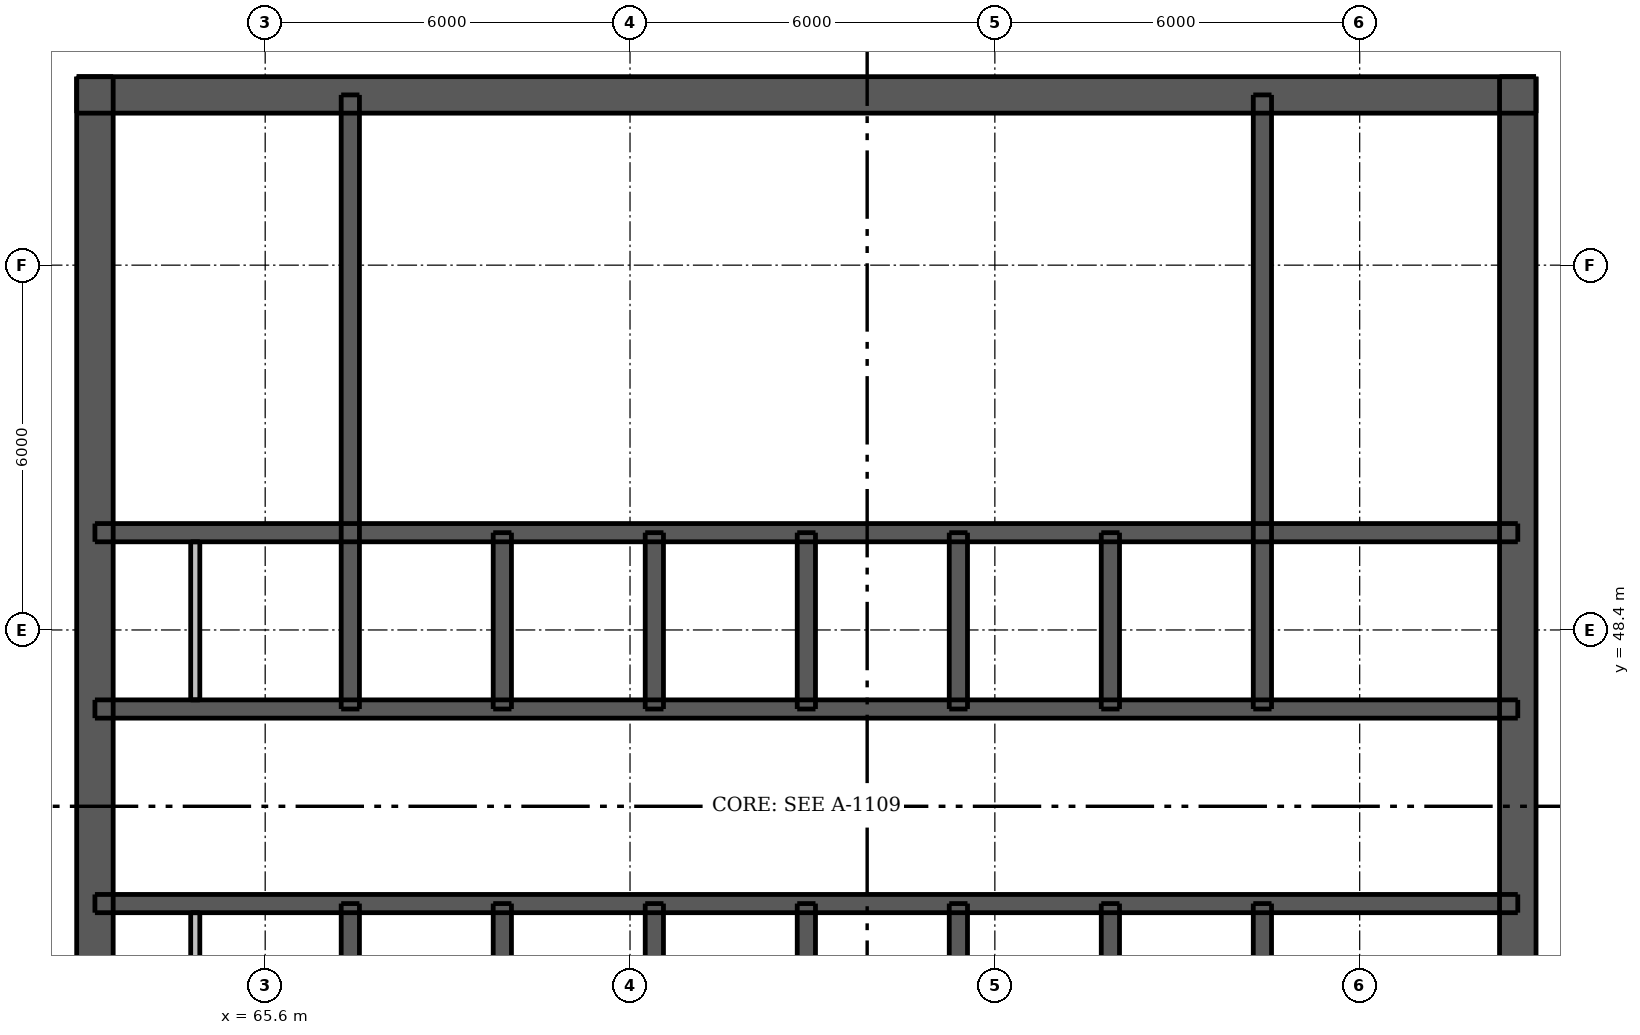
"""IFC4 building model, lengths in metres.
Left out: names, types, materials, properties, quantities, classifications, styles, units other than length and angle.
Written with IfcOpenShell. Run it as: python <this file> out.ifc"""

import sys

from ifc_helpers import new_model, si_unit, direction, frame, frame_2d, origin, place, context, subcontext, project, spatial, rectangle, extrude, element, fill, save


model = new_model("IFC4")
c1 = context("Model", 3, precision=1e-05, world=origin(), true_north=direction((0.0, 1.0)))
c2 = subcontext(c1, "Body", "Model", "MODEL_VIEW")
j1 = project(units=[si_unit("LENGTHUNIT", "METRE"), si_unit("PLANEANGLEUNIT", "RADIAN")], contexts=[c1])
p1 = place(None, origin())
s1 = spatial("IfcSite", under=j1, at=p1, CompositionType="ELEMENT")
p2 = place(p1, origin())
s2 = spatial("IfcBuilding", under=s1, at=p2, CompositionType="ELEMENT")
p3 = place(p2, frame((0.0, 0.0, 190.3)))
s3 = spatial("IfcBuildingStorey", under=s2, at=p3, CompositionType="ELEMENT", Elevation=190.3)
p4 = place(p3, frame((62.5, 57.2, 0.0), z_axis=(0.0, 0.0, 1.0), x_axis=(1.0, 0.0, 0.0)))
e1 = element("IfcWall", 1, at=p4, inside=s3, PredefinedType="SHEAR", context=c2, shape_type="SweptSolid", body=[
    extrude(rectangle(XDim=24.0, YDim=0.6, at=frame_2d((12.0, 0.0))), origin(), (0.0, 0.0, 1.0), 3.05),
])
p5 = place(p4, frame((20.975, 0.0, 0.0)))
e2 = element("IfcOpeningElement", 2, at=p5, cuts=e1, PredefinedType="OPENING", context=c2, shape_type="SweptSolid", body=[
    extrude(rectangle(XDim=1.1, YDim=2.1, at=frame_2d((0.55, 1.05))), frame((0.0, 0.31, 0.0), z_axis=(0.0, -1.0, 0.0), x_axis=(1.0, 0.0, 0.0)), (0.0, 0.0, 1.0), 0.62),
])
p6 = place(p4, frame((1.925, 0.0, 0.0)))
e3 = element("IfcOpeningElement", 3, at=p6, cuts=e1, PredefinedType="OPENING", context=c2, shape_type="SweptSolid", body=[
    extrude(rectangle(XDim=1.1, YDim=2.1, at=frame_2d((0.55, 1.05))), frame((0.0, 0.31, 0.0), z_axis=(0.0, -1.0, 0.0), x_axis=(1.0, 0.0, 0.0)), (0.0, 0.0, 1.0), 0.62),
])
p7 = place(p4, frame((11.55, 0.0, 0.0)))
e4 = element("IfcOpeningElement", 4, at=p7, cuts=e1, PredefinedType="OPENING", context=c2, shape_type="SweptSolid", body=[
    extrude(rectangle(XDim=0.9, YDim=2.1, at=frame_2d((0.45, 1.05))), frame((0.0, 0.31, 0.0), z_axis=(0.0, -1.0, 0.0), x_axis=(1.0, 0.0, 0.0)), (0.0, 0.0, 1.0), 0.62),
])
p8 = place(p3, frame((62.8, 33.5, 0.0), z_axis=(0.0, 0.0, 1.0), x_axis=(0.0, 1.0, 0.0)))
e5 = element("IfcWall", 5, at=p8, inside=s3, PredefinedType="SHEAR", context=c2, shape_type="SweptSolid", body=[
    extrude(rectangle(XDim=24.0, YDim=0.6, at=frame_2d((12.0, 0.0))), origin(), (0.0, 0.0, 1.0), 3.05),
])
p9 = place(p8, frame((11.2, 0.0, 0.0)))
e6 = element("IfcOpeningElement", 6, at=p9, cuts=e5, PredefinedType="OPENING", context=c2, shape_type="SweptSolid", body=[
    extrude(rectangle(XDim=1.6, YDim=2.1, at=frame_2d((0.8, 1.05))), frame((0.0, 0.31, 0.0), z_axis=(0.0, -1.0, 0.0), x_axis=(1.0, 0.0, 0.0)), (0.0, 0.0, 1.0), 0.62),
])
p10 = place(p3, frame((86.2, 33.5, 0.0), z_axis=(0.0, 0.0, 1.0), x_axis=(0.0, 1.0, 0.0)))
e7 = element("IfcWall", 7, at=p10, inside=s3, PredefinedType="SHEAR", context=c2, shape_type="SweptSolid", body=[
    extrude(rectangle(XDim=24.0, YDim=0.6, at=frame_2d((12.0, 0.0))), origin(), (0.0, 0.0, 1.0), 3.05),
])
p11 = place(p10, frame((11.2, 0.0, 0.0)))
e8 = element("IfcOpeningElement", 8, at=p11, cuts=e7, PredefinedType="OPENING", context=c2, shape_type="SweptSolid", body=[
    extrude(rectangle(XDim=1.6, YDim=2.1, at=frame_2d((0.8, 1.05))), frame((0.0, 0.31, 0.0), z_axis=(0.0, -1.0, 0.0), x_axis=(1.0, 0.0, 0.0)), (0.0, 0.0, 1.0), 0.62),
])
p12 = place(p3, frame((62.8, 43.9, 0.0), z_axis=(0.0, 0.0, 1.0), x_axis=(1.0, 0.0, 0.0)))
e9 = element("IfcWall", 9, at=p12, inside=s3, PredefinedType="SHEAR", context=c2, shape_type="SweptSolid", body=[
    extrude(rectangle(XDim=23.4, YDim=0.3, at=frame_2d((11.7, 0.0))), origin(), (0.0, 0.0, 1.0), 3.05),
])
p13 = place(p12, frame((0.575, 0.0, 0.0)))
e10 = element("IfcOpeningElement", 10, at=p13, cuts=e9, PredefinedType="OPENING", context=c2, shape_type="SweptSolid", body=[
    extrude(rectangle(XDim=0.8, YDim=2.1, at=frame_2d((0.4, 1.05))), frame((0.0, 0.16, 0.0), z_axis=(0.0, -1.0, 0.0), x_axis=(1.0, 0.0, 0.0)), (0.0, 0.0, 1.0), 0.32),
])
p14 = place(p12, frame((2.4, 0.0, 0.0)))
e11 = element("IfcOpeningElement", 11, at=p14, cuts=e9, PredefinedType="OPENING", context=c2, shape_type="SweptSolid", body=[
    extrude(rectangle(XDim=0.9, YDim=2.1, at=frame_2d((0.45, 1.05))), frame((0.0, 0.16, 0.0), z_axis=(0.0, -1.0, 0.0), x_axis=(1.0, 0.0, 0.0)), (0.0, 0.0, 1.0), 0.32),
])
p15 = place(p12, frame((20.775, 0.0, 0.0)))
e12 = element("IfcOpeningElement", 12, at=p15, cuts=e9, PredefinedType="OPENING", context=c2, shape_type="SweptSolid", body=[
    extrude(rectangle(XDim=0.9, YDim=2.1, at=frame_2d((0.45, 1.05))), frame((0.0, 0.16, 0.0), z_axis=(0.0, -1.0, 0.0), x_axis=(1.0, 0.0, 0.0)), (0.0, 0.0, 1.0), 0.32),
])
p16 = place(p12, frame((7.5, 0.0, 0.0)))
e13 = element("IfcOpeningElement", 13, at=p16, cuts=e9, PredefinedType="OPENING", context=c2, shape_type="SweptSolid", body=[
    extrude(rectangle(XDim=0.9, YDim=2.1, at=frame_2d((0.45, 1.05))), frame((0.0, 0.16, 0.0), z_axis=(0.0, -1.0, 0.0), x_axis=(1.0, 0.0, 0.0)), (0.0, 0.0, 1.0), 0.32),
])
p17 = place(p12, frame((10.0, 0.0, 0.0)))
e14 = element("IfcOpeningElement", 14, at=p17, cuts=e9, PredefinedType="OPENING", context=c2, shape_type="SweptSolid", body=[
    extrude(rectangle(XDim=0.9, YDim=2.1, at=frame_2d((0.45, 1.05))), frame((0.0, 0.16, 0.0), z_axis=(0.0, -1.0, 0.0), x_axis=(1.0, 0.0, 0.0)), (0.0, 0.0, 1.0), 0.32),
])
p18 = place(p12, frame((15.0, 0.0, 0.0)))
e15 = element("IfcOpeningElement", 15, at=p18, cuts=e9, PredefinedType="OPENING", context=c2, shape_type="SweptSolid", body=[
    extrude(rectangle(XDim=0.9, YDim=2.1, at=frame_2d((0.45, 1.05))), frame((0.0, 0.16, 0.0), z_axis=(0.0, -1.0, 0.0), x_axis=(1.0, 0.0, 0.0)), (0.0, 0.0, 1.0), 0.32),
])
p19 = place(p12, frame((17.5, 0.0, 0.0)))
e16 = element("IfcOpeningElement", 16, at=p19, cuts=e9, PredefinedType="OPENING", context=c2, shape_type="SweptSolid", body=[
    extrude(rectangle(XDim=0.9, YDim=2.1, at=frame_2d((0.45, 1.05))), frame((0.0, 0.16, 0.0), z_axis=(0.0, -1.0, 0.0), x_axis=(1.0, 0.0, 0.0)), (0.0, 0.0, 1.0), 0.32),
])
p20 = place(p3, frame((62.8, 47.1, 0.0), z_axis=(0.0, 0.0, 1.0), x_axis=(1.0, 0.0, 0.0)))
e17 = element("IfcWall", 17, at=p20, inside=s3, PredefinedType="SHEAR", context=c2, shape_type="SweptSolid", body=[
    extrude(rectangle(XDim=23.4, YDim=0.3, at=frame_2d((11.7, 0.0))), origin(), (0.0, 0.0, 1.0), 3.05),
])
p21 = place(p20, frame((0.575, 0.0, 0.0)))
e18 = element("IfcOpeningElement", 18, at=p21, cuts=e17, PredefinedType="OPENING", context=c2, shape_type="SweptSolid", body=[
    extrude(rectangle(XDim=0.8, YDim=2.1, at=frame_2d((0.4, 1.05))), frame((0.0, 0.16, 0.0), z_axis=(0.0, -1.0, 0.0), x_axis=(1.0, 0.0, 0.0)), (0.0, 0.0, 1.0), 0.32),
])
p22 = place(p20, frame((2.4, 0.0, 0.0)))
e19 = element("IfcOpeningElement", 19, at=p22, cuts=e17, PredefinedType="OPENING", context=c2, shape_type="SweptSolid", body=[
    extrude(rectangle(XDim=0.9, YDim=2.1, at=frame_2d((0.45, 1.05))), frame((0.0, 0.16, 0.0), z_axis=(0.0, -1.0, 0.0), x_axis=(1.0, 0.0, 0.0)), (0.0, 0.0, 1.0), 0.32),
])
p23 = place(p20, frame((20.775, 0.0, 0.0)))
e20 = element("IfcOpeningElement", 20, at=p23, cuts=e17, PredefinedType="OPENING", context=c2, shape_type="SweptSolid", body=[
    extrude(rectangle(XDim=0.9, YDim=2.1, at=frame_2d((0.45, 1.05))), frame((0.0, 0.16, 0.0), z_axis=(0.0, -1.0, 0.0), x_axis=(1.0, 0.0, 0.0)), (0.0, 0.0, 1.0), 0.32),
])
p24 = place(p20, frame((4.9, 0.0, 0.0)))
e21 = element("IfcOpeningElement", 21, at=p24, cuts=e17, PredefinedType="OPENING", context=c2, shape_type="SweptSolid", body=[
    extrude(rectangle(XDim=1.1, YDim=2.1, at=frame_2d((0.55, 1.05))), frame((0.0, 0.16, 0.0), z_axis=(0.0, -1.0, 0.0), x_axis=(1.0, 0.0, 0.0)), (0.0, 0.0, 1.0), 0.32),
])
p25 = place(p20, frame((7.4, 0.0, 0.0)))
e22 = element("IfcOpeningElement", 22, at=p25, cuts=e17, PredefinedType="OPENING", context=c2, shape_type="SweptSolid", body=[
    extrude(rectangle(XDim=1.1, YDim=2.1, at=frame_2d((0.55, 1.05))), frame((0.0, 0.16, 0.0), z_axis=(0.0, -1.0, 0.0), x_axis=(1.0, 0.0, 0.0)), (0.0, 0.0, 1.0), 0.32),
])
p26 = place(p20, frame((9.9, 0.0, 0.0)))
e23 = element("IfcOpeningElement", 23, at=p26, cuts=e17, PredefinedType="OPENING", context=c2, shape_type="SweptSolid", body=[
    extrude(rectangle(XDim=1.1, YDim=2.1, at=frame_2d((0.55, 1.05))), frame((0.0, 0.16, 0.0), z_axis=(0.0, -1.0, 0.0), x_axis=(1.0, 0.0, 0.0)), (0.0, 0.0, 1.0), 0.32),
])
p27 = place(p20, frame((12.4, 0.0, 0.0)))
e24 = element("IfcOpeningElement", 24, at=p27, cuts=e17, PredefinedType="OPENING", context=c2, shape_type="SweptSolid", body=[
    extrude(rectangle(XDim=1.1, YDim=2.1, at=frame_2d((0.55, 1.05))), frame((0.0, 0.16, 0.0), z_axis=(0.0, -1.0, 0.0), x_axis=(1.0, 0.0, 0.0)), (0.0, 0.0, 1.0), 0.32),
])
p28 = place(p20, frame((14.9, 0.0, 0.0)))
e25 = element("IfcOpeningElement", 25, at=p28, cuts=e17, PredefinedType="OPENING", context=c2, shape_type="SweptSolid", body=[
    extrude(rectangle(XDim=1.1, YDim=2.1, at=frame_2d((0.55, 1.05))), frame((0.0, 0.16, 0.0), z_axis=(0.0, -1.0, 0.0), x_axis=(1.0, 0.0, 0.0)), (0.0, 0.0, 1.0), 0.32),
])
p29 = place(p20, frame((17.4, 0.0, 0.0)))
e26 = element("IfcOpeningElement", 26, at=p29, cuts=e17, PredefinedType="OPENING", context=c2, shape_type="SweptSolid", body=[
    extrude(rectangle(XDim=1.1, YDim=2.1, at=frame_2d((0.55, 1.05))), frame((0.0, 0.16, 0.0), z_axis=(0.0, -1.0, 0.0), x_axis=(1.0, 0.0, 0.0)), (0.0, 0.0, 1.0), 0.32),
])
p30 = place(p3, frame((62.8, 50.0, 0.0), z_axis=(0.0, 0.0, 1.0), x_axis=(1.0, 0.0, 0.0)))
e27 = element("IfcWall", 27, at=p30, inside=s3, PredefinedType="SHEAR", context=c2, shape_type="SweptSolid", body=[
    extrude(rectangle(XDim=23.4, YDim=0.3, at=frame_2d((11.7, 0.0))), origin(), (0.0, 0.0, 1.0), 3.05),
])
p31 = place(p3, frame((67.0, 33.8, 0.0), z_axis=(0.0, 0.0, 1.0), x_axis=(0.0, 1.0, 0.0)))
e28 = element("IfcWall", 28, at=p31, inside=s3, PredefinedType="SHEAR", context=c2, shape_type="SweptSolid", body=[
    extrude(rectangle(XDim=10.1, YDim=0.3, at=frame_2d((5.05, 0.0))), origin(), (0.0, 0.0, 1.0), 3.05),
])
p32 = place(p31, frame((0.5, 0.0, 0.0)))
e29 = element("IfcOpeningElement", 29, at=p32, cuts=e28, PredefinedType="OPENING", context=c2, shape_type="SweptSolid", body=[
    extrude(rectangle(XDim=1.1, YDim=2.1, at=frame_2d((0.55, 1.05))), frame((0.0, 0.16, 0.0), z_axis=(0.0, -1.0, 0.0), x_axis=(1.0, 0.0, 0.0)), (0.0, 0.0, 1.0), 0.32),
])
for number, where, z_axis, x_axis in (
    (30, (67.0, 47.1, 0.0), (0.0, 0.0, 1.0), (0.0, 1.0, 0.0)),
    (31, (82.0, 33.8, 0.0), (0.0, 0.0, 1.0), (0.0, 1.0, 0.0)),
    (32, (82.0, 47.1, 0.0), (0.0, 0.0, 1.0), (0.0, 1.0, 0.0)),
):
    element("IfcWall", number, at=place(p3, frame(where, z_axis=z_axis, x_axis=x_axis)), inside=s3, PredefinedType="SHEAR", context=c2, shape_type="SweptSolid", body=[
        extrude(rectangle(XDim=10.1, YDim=0.3, at=frame_2d((5.05, 0.0))), origin(), (0.0, 0.0, 1.0), 3.05),
    ])
for number, where, z_axis, x_axis in (
    (33, (69.5, 41.0, 0.0), (0.0, 0.0, 1.0), (0.0, 1.0, 0.0)),
    (34, (69.5, 47.1, 0.0), (0.0, 0.0, 1.0), (0.0, 1.0, 0.0)),
    (35, (72.0, 41.0, 0.0), (0.0, 0.0, 1.0), (0.0, 1.0, 0.0)),
    (36, (72.0, 47.1, 0.0), (0.0, 0.0, 1.0), (0.0, 1.0, 0.0)),
    (37, (74.5, 41.0, 0.0), (0.0, 0.0, 1.0), (0.0, 1.0, 0.0)),
    (38, (74.5, 47.1, 0.0), (0.0, 0.0, 1.0), (0.0, 1.0, 0.0)),
    (39, (77.0, 41.0, 0.0), (0.0, 0.0, 1.0), (0.0, 1.0, 0.0)),
    (40, (77.0, 47.1, 0.0), (0.0, 0.0, 1.0), (0.0, 1.0, 0.0)),
    (41, (79.5, 41.0, 0.0), (0.0, 0.0, 1.0), (0.0, 1.0, 0.0)),
    (42, (79.5, 47.1, 0.0), (0.0, 0.0, 1.0), (0.0, 1.0, 0.0)),
):
    element("IfcWall", number, at=place(p3, frame(where, z_axis=z_axis, x_axis=x_axis)), inside=s3, PredefinedType="SHEAR", context=c2, shape_type="SweptSolid", body=[
        extrude(rectangle(XDim=2.9, YDim=0.3, at=frame_2d((1.45, 0.0))), origin(), (0.0, 0.0, 1.0), 3.05),
    ])
for number, where, z_axis, x_axis in (
    (43, (64.45, 41.15, 0.0), (0.0, 0.0, 1.0), (0.0, 1.0, 0.0)),
    (44, (64.45, 47.25, 0.0), (0.0, 0.0, 1.0), (0.0, 1.0, 0.0)),
):
    element("IfcWall", number, at=place(p3, frame(where, z_axis=z_axis, x_axis=x_axis)), inside=s3, PredefinedType="PLUMBINGWALL", context=c2, shape_type="SweptSolid", body=[
        extrude(rectangle(XDim=2.6, YDim=0.15, at=frame_2d((1.3, 0.0))), origin(), (0.0, 0.0, 1.0), 3.05),
    ])
p33 = place(p5, origin())
e45 = element("IfcDoor", 45, at=p33, inside=s3, OperationType="SINGLE_SWING_RIGHT", PredefinedType="DOOR", context=c2, shape_type="SweptSolid", body=[
    extrude(rectangle(XDim=1.1, YDim=2.1, at=frame_2d((0.55, 1.05))), frame((0.0, -0.237, 0.0), z_axis=(0.0, -1.0, 0.0), x_axis=(1.0, 0.0, 0.0)), (0.0, 0.0, 1.0), 0.05),
])
fill(e2, e45)
p34 = place(p6, origin())
e46 = element("IfcDoor", 46, at=p34, inside=s3, OperationType="SINGLE_SWING_LEFT", PredefinedType="DOOR", context=c2, shape_type="SweptSolid", body=[
    extrude(rectangle(XDim=1.1, YDim=2.1, at=frame_2d((0.55, 1.05))), frame((0.0, -0.237, 0.0), z_axis=(0.0, -1.0, 0.0), x_axis=(1.0, 0.0, 0.0)), (0.0, 0.0, 1.0), 0.05),
])
fill(e3, e46)
p35 = place(p9, origin())
e47 = element("IfcDoor", 47, at=p35, inside=s3, OperationType="DOUBLE_DOOR_SINGLE_SWING", PredefinedType="DOOR", context=c2, shape_type="SweptSolid", body=[
    extrude(rectangle(XDim=1.6, YDim=2.1, at=frame_2d((0.8, 1.05))), frame((0.0, -0.237, 0.0), z_axis=(0.0, -1.0, 0.0), x_axis=(1.0, 0.0, 0.0)), (0.0, 0.0, 1.0), 0.05),
])
fill(e6, e47)
p36 = place(p11, origin())
e48 = element("IfcDoor", 48, at=p36, inside=s3, OperationType="DOUBLE_DOOR_SINGLE_SWING", PredefinedType="DOOR", context=c2, shape_type="SweptSolid", body=[
    extrude(rectangle(XDim=1.6, YDim=2.1, at=frame_2d((0.8, 1.05))), frame((0.0, 0.288, 0.0), z_axis=(0.0, -1.0, 0.0), x_axis=(1.0, 0.0, 0.0)), (0.0, 0.0, 1.0), 0.05),
])
fill(e8, e48)
p37 = place(p13, origin())
e49 = element("IfcDoor", 49, at=p37, inside=s3, OperationType="SINGLE_SWING_LEFT", PredefinedType="DOOR", context=c2, shape_type="SweptSolid", body=[
    extrude(rectangle(XDim=0.8, YDim=2.1, at=frame_2d((0.4, 1.05))), frame((0.0, -0.087, 0.0), z_axis=(0.0, -1.0, 0.0), x_axis=(1.0, 0.0, 0.0)), (0.0, 0.0, 1.0), 0.05),
])
fill(e10, e49)
p38 = place(p14, origin())
e50 = element("IfcDoor", 50, at=p38, inside=s3, OperationType="SINGLE_SWING_RIGHT", PredefinedType="DOOR", context=c2, shape_type="SweptSolid", body=[
    extrude(rectangle(XDim=0.9, YDim=2.1, at=frame_2d((0.45, 1.05))), frame((0.0, -0.087, 0.0), z_axis=(0.0, -1.0, 0.0), x_axis=(1.0, 0.0, 0.0)), (0.0, 0.0, 1.0), 0.05),
])
fill(e11, e50)
p39 = place(p15, origin())
e51 = element("IfcDoor", 51, at=p39, inside=s3, OperationType="SINGLE_SWING_LEFT", PredefinedType="DOOR", context=c2, shape_type="SweptSolid", body=[
    extrude(rectangle(XDim=0.9, YDim=2.1, at=frame_2d((0.45, 1.05))), frame((0.0, -0.087, 0.0), z_axis=(0.0, -1.0, 0.0), x_axis=(1.0, 0.0, 0.0)), (0.0, 0.0, 1.0), 0.05),
])
fill(e12, e51)
p40 = place(p21, origin())
e52 = element("IfcDoor", 52, at=p40, inside=s3, OperationType="SINGLE_SWING_LEFT", PredefinedType="DOOR", context=c2, shape_type="SweptSolid", body=[
    extrude(rectangle(XDim=0.8, YDim=2.1, at=frame_2d((0.4, 1.05))), frame((0.0, 0.138, 0.0), z_axis=(0.0, -1.0, 0.0), x_axis=(1.0, 0.0, 0.0)), (0.0, 0.0, 1.0), 0.05),
])
fill(e18, e52)
p41 = place(p22, origin())
e53 = element("IfcDoor", 53, at=p41, inside=s3, OperationType="SINGLE_SWING_RIGHT", PredefinedType="DOOR", context=c2, shape_type="SweptSolid", body=[
    extrude(rectangle(XDim=0.9, YDim=2.1, at=frame_2d((0.45, 1.05))), frame((0.0, 0.138, 0.0), z_axis=(0.0, -1.0, 0.0), x_axis=(1.0, 0.0, 0.0)), (0.0, 0.0, 1.0), 0.05),
])
fill(e19, e53)
p42 = place(p23, origin())
e54 = element("IfcDoor", 54, at=p42, inside=s3, OperationType="SINGLE_SWING_LEFT", PredefinedType="DOOR", context=c2, shape_type="SweptSolid", body=[
    extrude(rectangle(XDim=0.9, YDim=2.1, at=frame_2d((0.45, 1.05))), frame((0.0, 0.138, 0.0), z_axis=(0.0, -1.0, 0.0), x_axis=(1.0, 0.0, 0.0)), (0.0, 0.0, 1.0), 0.05),
])
fill(e20, e54)
p43 = place(p7, origin())
e55 = element("IfcDoor", 55, at=p43, inside=s3, OperationType="SINGLE_SWING_RIGHT", PredefinedType="DOOR", context=c2, shape_type="SweptSolid", body=[
    extrude(rectangle(XDim=0.9, YDim=2.1, at=frame_2d((0.45, 1.05))), frame((0.0, -0.237, 0.0), z_axis=(0.0, -1.0, 0.0), x_axis=(1.0, 0.0, 0.0)), (0.0, 0.0, 1.0), 0.05),
])
fill(e4, e55)
p44 = place(p16, origin())
e56 = element("IfcDoor", 56, at=p44, inside=s3, OperationType="SINGLE_SWING_LEFT", PredefinedType="DOOR", context=c2, shape_type="SweptSolid", body=[
    extrude(rectangle(XDim=0.9, YDim=2.1, at=frame_2d((0.45, 1.05))), frame((0.0, -0.087, 0.0), z_axis=(0.0, -1.0, 0.0), x_axis=(1.0, 0.0, 0.0)), (0.0, 0.0, 1.0), 0.05),
])
fill(e13, e56)
p45 = place(p17, origin())
e57 = element("IfcDoor", 57, at=p45, inside=s3, OperationType="SINGLE_SWING_RIGHT", PredefinedType="DOOR", context=c2, shape_type="SweptSolid", body=[
    extrude(rectangle(XDim=0.9, YDim=2.1, at=frame_2d((0.45, 1.05))), frame((0.0, -0.087, 0.0), z_axis=(0.0, -1.0, 0.0), x_axis=(1.0, 0.0, 0.0)), (0.0, 0.0, 1.0), 0.05),
])
fill(e14, e57)
p46 = place(p18, origin())
e58 = element("IfcDoor", 58, at=p46, inside=s3, OperationType="SINGLE_SWING_RIGHT", PredefinedType="DOOR", context=c2, shape_type="SweptSolid", body=[
    extrude(rectangle(XDim=0.9, YDim=2.1, at=frame_2d((0.45, 1.05))), frame((0.0, -0.087, 0.0), z_axis=(0.0, -1.0, 0.0), x_axis=(1.0, 0.0, 0.0)), (0.0, 0.0, 1.0), 0.05),
])
fill(e15, e58)
p47 = place(p19, origin())
e59 = element("IfcDoor", 59, at=p47, inside=s3, OperationType="SINGLE_SWING_LEFT", PredefinedType="DOOR", context=c2, shape_type="SweptSolid", body=[
    extrude(rectangle(XDim=0.9, YDim=2.1, at=frame_2d((0.45, 1.05))), frame((0.0, -0.087, 0.0), z_axis=(0.0, -1.0, 0.0), x_axis=(1.0, 0.0, 0.0)), (0.0, 0.0, 1.0), 0.05),
])
fill(e16, e59)
p48 = place(p24, origin())
e60 = element("IfcDoor", 60, at=p48, inside=s3, OperationType="DOUBLE_DOOR_SLIDING", PredefinedType="DOOR", context=c2, shape_type="SweptSolid", body=[
    extrude(rectangle(XDim=1.1, YDim=2.1, at=frame_2d((0.55, 1.05))), frame((0.0, 0.025, 0.0), z_axis=(0.0, -1.0, 0.0), x_axis=(1.0, 0.0, 0.0)), (0.0, 0.0, 1.0), 0.05),
])
fill(e21, e60)
p49 = place(p25, origin())
e61 = element("IfcDoor", 61, at=p49, inside=s3, OperationType="DOUBLE_DOOR_SLIDING", PredefinedType="DOOR", context=c2, shape_type="SweptSolid", body=[
    extrude(rectangle(XDim=1.1, YDim=2.1, at=frame_2d((0.55, 1.05))), frame((0.0, 0.025, 0.0), z_axis=(0.0, -1.0, 0.0), x_axis=(1.0, 0.0, 0.0)), (0.0, 0.0, 1.0), 0.05),
])
fill(e22, e61)
p50 = place(p26, origin())
e62 = element("IfcDoor", 62, at=p50, inside=s3, OperationType="DOUBLE_DOOR_SLIDING", PredefinedType="DOOR", context=c2, shape_type="SweptSolid", body=[
    extrude(rectangle(XDim=1.1, YDim=2.1, at=frame_2d((0.55, 1.05))), frame((0.0, 0.025, 0.0), z_axis=(0.0, -1.0, 0.0), x_axis=(1.0, 0.0, 0.0)), (0.0, 0.0, 1.0), 0.05),
])
fill(e23, e62)
p51 = place(p27, origin())
e63 = element("IfcDoor", 63, at=p51, inside=s3, OperationType="DOUBLE_DOOR_SLIDING", PredefinedType="DOOR", context=c2, shape_type="SweptSolid", body=[
    extrude(rectangle(XDim=1.1, YDim=2.1, at=frame_2d((0.55, 1.05))), frame((0.0, 0.025, 0.0), z_axis=(0.0, -1.0, 0.0), x_axis=(1.0, 0.0, 0.0)), (0.0, 0.0, 1.0), 0.05),
])
fill(e24, e63)
p52 = place(p28, origin())
e64 = element("IfcDoor", 64, at=p52, inside=s3, OperationType="DOUBLE_DOOR_SLIDING", PredefinedType="DOOR", context=c2, shape_type="SweptSolid", body=[
    extrude(rectangle(XDim=1.1, YDim=2.1, at=frame_2d((0.55, 1.05))), frame((0.0, 0.025, 0.0), z_axis=(0.0, -1.0, 0.0), x_axis=(1.0, 0.0, 0.0)), (0.0, 0.0, 1.0), 0.05),
])
fill(e25, e64)
p53 = place(p29, origin())
e65 = element("IfcDoor", 65, at=p53, inside=s3, OperationType="DOUBLE_DOOR_SLIDING", PredefinedType="DOOR", context=c2, shape_type="SweptSolid", body=[
    extrude(rectangle(XDim=1.1, YDim=2.1, at=frame_2d((0.55, 1.05))), frame((0.0, 0.025, 0.0), z_axis=(0.0, -1.0, 0.0), x_axis=(1.0, 0.0, 0.0)), (0.0, 0.0, 1.0), 0.05),
])
fill(e26, e65)
save(model, sys.argv[1])
